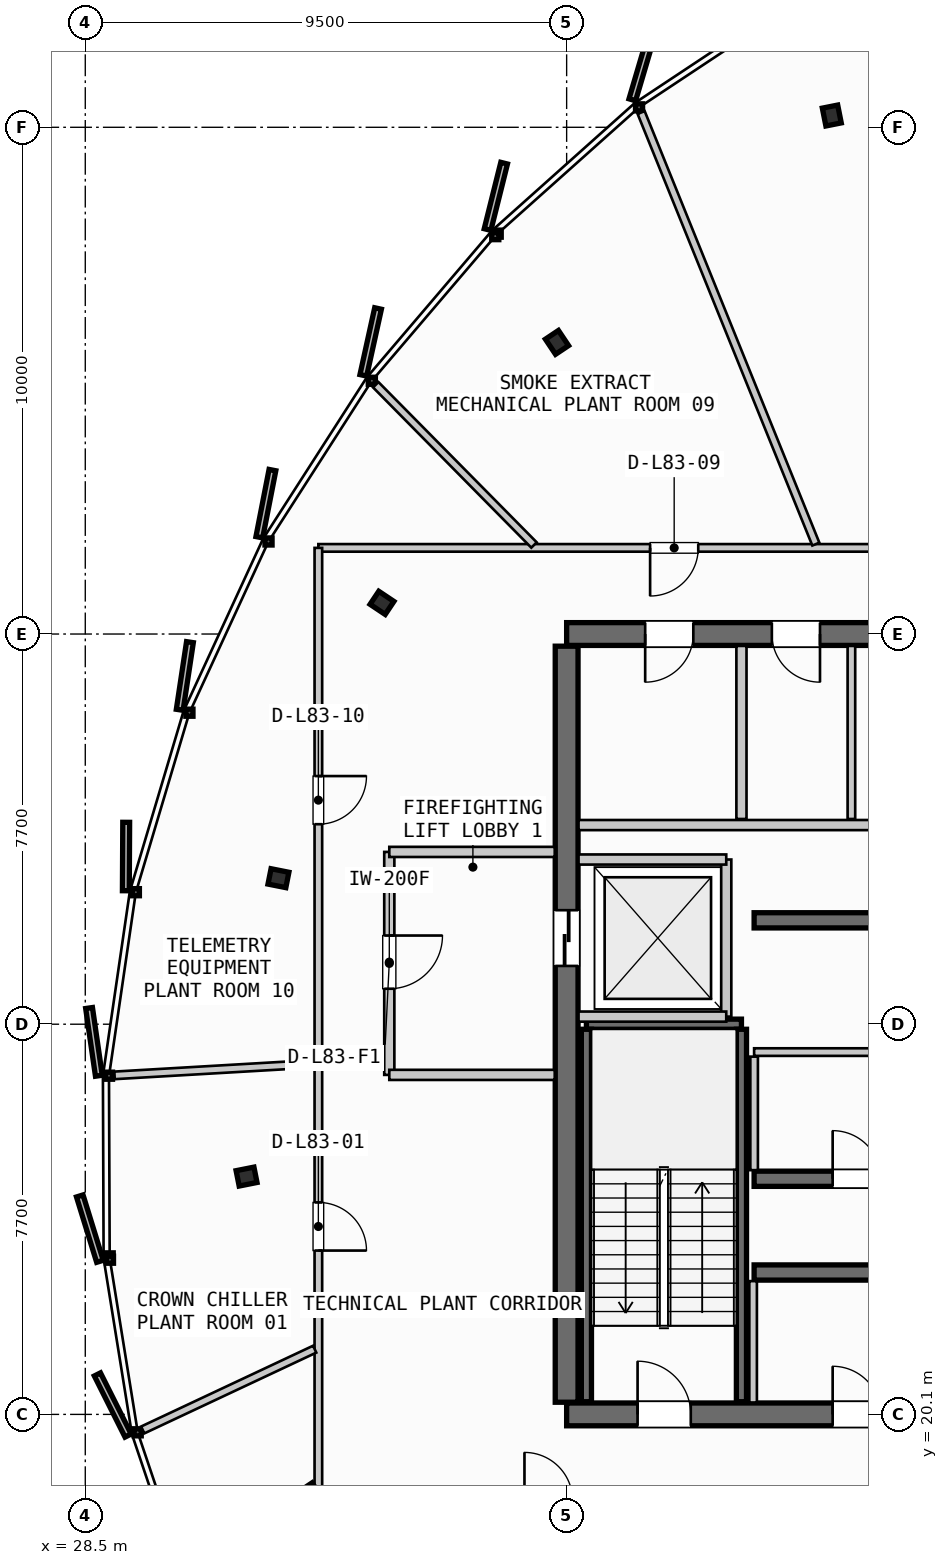
"""IFC4 building model, lengths in metres.
Left out: names, types, materials, properties, quantities, classifications, styles, units other than length and angle.
Written with IfcOpenShell. Run it as: python <this file> out.ifc"""

import sys

from ifc_helpers import new_model, si_unit, direction, frame, frame_2d, origin, origin_2d, place, context, subcontext, project, spatial, rectangle, i_section, extrude, source, transform, mapped, element, fill, save


model = new_model("IFC4")
c1 = context("Model", 3, precision=1e-05, world=origin(), true_north=direction((0.0, 1.0)))
c2 = subcontext(c1, "Body", "Model", "MODEL_VIEW")
j1 = project(units=[si_unit("LENGTHUNIT", "METRE"), si_unit("PLANEANGLEUNIT", "RADIAN")], contexts=[c1])
p1 = place(None, origin())
s1 = spatial("IfcSite", under=j1, at=p1, CompositionType="ELEMENT")
p2 = place(p1, origin())
s2 = spatial("IfcBuilding", under=s1, at=p2, CompositionType="ELEMENT")
p3 = place(p2, frame((0.0, 0.0, 312.3)))
s3 = spatial("IfcBuildingStorey", under=s2, at=p3, CompositionType="ELEMENT", Elevation=312.3)
p4 = place(p3, frame((38.0, 20.1, 0.0), z_axis=(0.0, 0.0, 1.0), x_axis=(1.0, 0.0, 0.0)))
e1 = element("IfcWall", 1, at=p4, inside=s3, PredefinedType="SHEAR", context=c2, shape_type="SweptSolid", body=[
    extrude(rectangle(XDim=17.6, YDim=0.45, at=frame_2d((8.8, 0.0))), origin(), (0.0, 0.0, 1.0), 3.735),
])
p5 = place(p4, frame((1.4, 0.0, 0.0)))
e2 = element("IfcOpeningElement", 2, at=p5, cuts=e1, PredefinedType="OPENING", context=c2, shape_type="SweptSolid", body=[
    extrude(rectangle(XDim=1.05, YDim=2.15, at=frame_2d((0.525, 1.075))), frame((0.0, 0.235, 0.0), z_axis=(0.0, -1.0, 0.0), x_axis=(1.0, 0.0, 0.0)), (0.0, 0.0, 1.0), 0.47),
])
p6 = place(p4, frame((15.15, 0.0, 0.0)))
e3 = element("IfcOpeningElement", 3, at=p6, cuts=e1, PredefinedType="OPENING", context=c2, shape_type="SweptSolid", body=[
    extrude(rectangle(XDim=1.05, YDim=2.15, at=frame_2d((0.525, 1.075))), frame((0.0, 0.235, 0.0), z_axis=(0.0, -1.0, 0.0), x_axis=(1.0, 0.0, 0.0)), (0.0, 0.0, 1.0), 0.47),
])
p7 = place(p4, frame((5.25, 0.0, 0.0)))
e4 = element("IfcOpeningElement", 4, at=p7, cuts=e1, PredefinedType="OPENING", context=c2, shape_type="SweptSolid", body=[
    extrude(rectangle(XDim=0.95, YDim=2.15, at=frame_2d((0.475, 1.075))), frame((0.0, 0.235, 0.0), z_axis=(0.0, -1.0, 0.0), x_axis=(1.0, 0.0, 0.0)), (0.0, 0.0, 1.0), 0.47),
])
p8 = place(p4, frame((11.4, 0.0, 0.0)))
e5 = element("IfcOpeningElement", 5, at=p8, cuts=e1, PredefinedType="OPENING", context=c2, shape_type="SweptSolid", body=[
    extrude(rectangle(XDim=0.95, YDim=2.15, at=frame_2d((0.475, 1.075))), frame((0.0, 0.235, 0.0), z_axis=(0.0, -1.0, 0.0), x_axis=(1.0, 0.0, 0.0)), (0.0, 0.0, 1.0), 0.47),
])
p9 = place(p3, frame((55.6, 35.5, 0.0), z_axis=(0.0, 0.0, 1.0), x_axis=(-1.0, 0.0, 0.0)))
e6 = element("IfcWall", 6, at=p9, inside=s3, PredefinedType="SHEAR", context=c2, shape_type="SweptSolid", body=[
    extrude(rectangle(XDim=17.6, YDim=0.45, at=frame_2d((8.8, 0.0))), origin(), (0.0, 0.0, 1.0), 3.735),
])
p10 = place(p9, frame((8.05, 0.0, 0.0)))
e7 = element("IfcOpeningElement", 7, at=p10, cuts=e6, PredefinedType="OPENING", context=c2, shape_type="SweptSolid", body=[
    extrude(rectangle(XDim=1.5, YDim=2.2, at=frame_2d((0.75, 1.1))), frame((0.0, 0.235, 0.0), z_axis=(0.0, -1.0, 0.0), x_axis=(1.0, 0.0, 0.0)), (0.0, 0.0, 1.0), 0.47),
])
p11 = place(p9, frame((15.1, 0.0, 0.0)))
e8 = element("IfcOpeningElement", 8, at=p11, cuts=e6, PredefinedType="OPENING", context=c2, shape_type="SweptSolid", body=[
    extrude(rectangle(XDim=0.95, YDim=2.15, at=frame_2d((0.475, 1.075))), frame((0.0, 0.235, 0.0), z_axis=(0.0, -1.0, 0.0), x_axis=(1.0, 0.0, 0.0)), (0.0, 0.0, 1.0), 0.47),
])
p12 = place(p9, frame((12.6, 0.0, 0.0)))
e9 = element("IfcOpeningElement", 9, at=p12, cuts=e6, PredefinedType="OPENING", context=c2, shape_type="SweptSolid", body=[
    extrude(rectangle(XDim=0.95, YDim=2.15, at=frame_2d((0.475, 1.075))), frame((0.0, 0.235, 0.0), z_axis=(0.0, -1.0, 0.0), x_axis=(1.0, 0.0, 0.0)), (0.0, 0.0, 1.0), 0.47),
])
p13 = place(p9, frame((10.45, 0.0, 0.0)))
e10 = element("IfcOpeningElement", 10, at=p13, cuts=e6, PredefinedType="OPENING", context=c2, shape_type="SweptSolid", body=[
    extrude(rectangle(XDim=0.95, YDim=2.15, at=frame_2d((0.475, 1.075))), frame((0.0, 0.235, 0.0), z_axis=(0.0, -1.0, 0.0), x_axis=(1.0, 0.0, 0.0)), (0.0, 0.0, 1.0), 0.47),
])
p14 = place(p3, frame((38.0, 35.26, 0.0), z_axis=(0.0, 0.0, 1.0), x_axis=(0.0, -1.0, 0.0)))
e11 = element("IfcWall", 11, at=p14, inside=s3, PredefinedType="SHEAR", context=c2, shape_type="SweptSolid", body=[
    extrude(rectangle(XDim=14.92, YDim=0.45, at=frame_2d((7.46, 0.0))), origin(), (0.0, 0.0, 1.0), 3.735),
])
p15 = place(p14, frame((5.21, 0.0, 0.0)))
e12 = element("IfcOpeningElement", 12, at=p15, cuts=e11, PredefinedType="OPENING", context=c2, shape_type="SweptSolid", body=[
    extrude(rectangle(XDim=1.1, YDim=2.2, at=frame_2d((0.55, 1.1))), frame((0.0, 0.235, 0.0), z_axis=(0.0, -1.0, 0.0), x_axis=(1.0, 0.0, 0.0)), (0.0, 0.0, 1.0), 0.47),
])
p16 = place(p3, frame((41.7, 22.9, 0.0), z_axis=(0.0, 0.0, 1.0), x_axis=(1.0, 0.0, 0.0)))
e13 = element("IfcWall", 13, at=p16, inside=s3, PredefinedType="SHEAR", context=c2, shape_type="SweptSolid", body=[
    extrude(rectangle(XDim=4.25, YDim=0.3, at=frame_2d((2.125, 0.0))), origin(), (0.0, 0.0, 1.0), 3.735),
])
p17 = place(p3, frame((41.7, 24.75, 0.0), z_axis=(0.0, 0.0, 1.0), x_axis=(1.0, 0.0, 0.0)))
e14 = element("IfcWall", 14, at=p17, inside=s3, PredefinedType="SHEAR", context=c2, shape_type="SweptSolid", body=[
    extrude(rectangle(XDim=4.25, YDim=0.3, at=frame_2d((2.125, 0.0))), origin(), (0.0, 0.0, 1.0), 3.735),
])
p18 = place(p17, frame((1.55, 0.0, 0.0)))
e15 = element("IfcOpeningElement", 15, at=p18, cuts=e14, PredefinedType="OPENING", context=c2, shape_type="SweptSolid", body=[
    extrude(rectangle(XDim=0.95, YDim=2.15, at=frame_2d((0.475, 1.075))), frame((0.0, 0.16, 0.0), z_axis=(0.0, -1.0, 0.0), x_axis=(1.0, 0.0, 0.0)), (0.0, 0.0, 1.0), 0.32),
])
p19 = place(p3, frame((41.7, 29.85, 0.0), z_axis=(0.0, 0.0, 1.0), x_axis=(1.0, 0.0, 0.0)))
e16 = element("IfcWall", 16, at=p19, inside=s3, PredefinedType="SHEAR", context=c2, shape_type="SweptSolid", body=[
    extrude(rectangle(XDim=4.25, YDim=0.3, at=frame_2d((2.125, 0.0))), origin(), (0.0, 0.0, 1.0), 3.735),
])
m1 = source(origin(), c2, "Body", "SweptSolid", [
    extrude(i_section(OverallWidth=0.309, OverallDepth=0.359, WebThickness=0.016, FlangeThickness=0.026, FilletRadius=0.027, at=origin_2d()), origin(), (0.0, 0.0, 1.0), 3.735),
])
for number, where, z_axis, x_axis in (
    (17, (43.233, 45.732, 0.0), (0.0, 0.0, 1.0), (-0.195, 0.981, 0.0)),
    (18, (37.81, 41.255, 0.0), (0.0, 0.0, 1.0), (-0.556, 0.831, 0.0)),
    (19, (34.356, 36.115, 0.0), (0.0, 0.0, 1.0), (-0.831, 0.556, 0.0)),
    (20, (32.312, 30.682, 0.0), (0.0, 0.0, 1.0), (-0.981, 0.195, 0.0)),
    (21, (31.683, 24.793, 0.0), (0.0, 0.0, 1.0), (-0.981, -0.195, 0.0)),
    (22, (32.913, 18.521, 0.0), (0.0, 0.0, 1.0), (-0.831, -0.556, 0.0)),
):
    element("IfcColumn", number, at=place(p3, frame(where, z_axis=z_axis, x_axis=x_axis)), inside=s3, PredefinedType="COLUMN", context=c2, shape_type="MappedRepresentation", body=[
        mapped(m1, transform((0.0, 0.0, 0.0), scale=1.0)),
    ])
p20 = place(p3, frame((38.39, 27.8, 0.0), z_axis=(0.0, 0.0, 1.0), x_axis=(1.0, 0.0, 0.0)))
e23 = element("IfcWall", 23, at=p20, inside=s3, PredefinedType="SHEAR", context=c2, shape_type="SweptSolid", body=[
    extrude(rectangle(XDim=3.06, YDim=0.2, at=frame_2d((1.53, 0.0))), origin(), (0.0, 0.0, 1.0), 3.735),
])
for number, where, z_axis, x_axis in (
    (24, (41.45, 27.7, 0.0), (0.0, 0.0, 1.0), (0.0, -1.0, 0.0)),
    (25, (38.39, 20.35, 0.0), (0.0, 0.0, 1.0), (0.0, 1.0, 0.0)),
):
    element("IfcWall", number, at=place(p3, frame(where, z_axis=z_axis, x_axis=x_axis)), inside=s3, PredefinedType="SHEAR", context=c2, shape_type="SweptSolid", body=[
        extrude(rectangle(XDim=7.35, YDim=0.2, at=frame_2d((3.675, 0.0))), origin(), (0.0, 0.0, 1.0), 3.735),
    ])
p21 = place(p3, frame((41.15, 27.95, 0.0), z_axis=(0.0, 0.0, 1.0), x_axis=(0.0, 1.0, 0.0)))
e26 = element("IfcWall", 26, at=p21, inside=s3, PredefinedType="PARTITIONING", context=c2, shape_type="SweptSolid", body=[
    extrude(rectangle(XDim=3.1, YDim=0.2, at=frame_2d((1.55, 0.0))), origin(), (0.0, 0.0, 1.0), 3.26),
])
for number, where, z_axis, x_axis in (
    (27, (38.235, 27.95, 0.0), (0.0, 0.0, 1.0), (1.0, 0.0, 0.0)),
    (28, (38.235, 31.05, 0.0), (0.0, 0.0, 1.0), (1.0, 0.0, 0.0)),
):
    element("IfcWall", number, at=place(p3, frame(where, z_axis=z_axis, x_axis=x_axis)), inside=s3, PredefinedType="PARTITIONING", context=c2, shape_type="SweptSolid", body=[
        extrude(rectangle(XDim=2.915, YDim=0.2, at=frame_2d((1.458, 0.0))), origin(), (0.0, 0.0, 1.0), 3.26),
    ])
p22 = place(p3, frame((34.5, 31.2, 0.0), z_axis=(0.0, 0.0, 1.0), x_axis=(0.0, -1.0, 0.0)))
e29 = element("IfcWall", 29, at=p22, inside=s3, PredefinedType="PARTITIONING", context=c2, shape_type="SweptSolid", body=[
    extrude(rectangle(XDim=4.4, YDim=0.2, at=frame_2d((2.2, 0.0))), origin(), (0.0, 0.0, 1.0), 3.26),
])
p23 = place(p22, frame((1.65, 0.0, 0.0)))
e30 = element("IfcOpeningElement", 30, at=p23, cuts=e29, PredefinedType="OPENING", context=c2, shape_type="SweptSolid", body=[
    extrude(rectangle(XDim=1.05, YDim=2.15, at=frame_2d((0.525, 1.075))), frame((0.0, 0.11, 0.0), z_axis=(0.0, -1.0, 0.0), x_axis=(1.0, 0.0, 0.0)), (0.0, 0.0, 1.0), 0.22),
])
for number, where, z_axis, x_axis in (
    (31, (34.5, 26.8, 0.0), (0.0, 0.0, 1.0), (1.0, 0.0, 0.0)),
    (32, (34.5, 31.2, 0.0), (0.0, 0.0, 1.0), (1.0, 0.0, 0.0)),
):
    element("IfcWall", number, at=place(p3, frame(where, z_axis=z_axis, x_axis=x_axis)), inside=s3, PredefinedType="PARTITIONING", context=c2, shape_type="SweptSolid", body=[
        extrude(rectangle(XDim=3.265, YDim=0.2, at=frame_2d((1.632, 0.0))), origin(), (0.0, 0.0, 1.0), 3.26),
    ])
p24 = place(p3, frame((41.68, 20.335, 0.0), z_axis=(0.0, 0.0, 1.0), x_axis=(0.0, 1.0, 0.0)))
e33 = element("IfcWall", 33, at=p24, inside=s3, PredefinedType="PARTITIONING", context=c2, shape_type="SweptSolid", body=[
    extrude(rectangle(XDim=2.395, YDim=0.15, at=frame_2d((1.198, 0.0))), origin(), (0.0, 0.0, 1.0), 3.26),
])
p25 = place(p3, frame((41.7, 27.25, 0.0), z_axis=(0.0, 0.0, 1.0), x_axis=(1.0, 0.0, 0.0)))
e34 = element("IfcWall", 34, at=p25, inside=s3, PredefinedType="PARTITIONING", context=c2, shape_type="SweptSolid", body=[
    extrude(rectangle(XDim=4.25, YDim=0.15, at=frame_2d((2.125, 0.0))), origin(), (0.0, 0.0, 1.0), 3.26),
])
p26 = place(p3, frame((41.7, 24.92, 0.0), z_axis=(0.0, 0.0, 1.0), x_axis=(0.0, 1.0, 0.0)))
e35 = element("IfcWall", 35, at=p26, inside=s3, PredefinedType="PARTITIONING", context=c2, shape_type="SweptSolid", body=[
    extrude(rectangle(XDim=2.24, YDim=0.15, at=frame_2d((1.12, 0.0))), origin(), (0.0, 0.0, 1.0), 3.26),
])
p27 = place(p3, frame((41.45, 31.85, 0.0), z_axis=(0.0, 0.0, 1.0), x_axis=(0.0, 1.0, 0.0)))
e36 = element("IfcWall", 36, at=p27, inside=s3, PredefinedType="PARTITIONING", context=c2, shape_type="SweptSolid", body=[
    extrude(rectangle(XDim=3.415, YDim=0.2, at=frame_2d((1.708, 0.0))), origin(), (0.0, 0.0, 1.0), 3.26),
])
p28 = place(p3, frame((38.235, 31.73, 0.0), z_axis=(0.0, 0.0, 1.0), x_axis=(1.0, 0.0, 0.0)))
e37 = element("IfcWall", 37, at=p28, inside=s3, PredefinedType="PARTITIONING", context=c2, shape_type="SweptSolid", body=[
    extrude(rectangle(XDim=7.565, YDim=0.2, at=frame_2d((3.782, 0.0))), origin(), (0.0, 0.0, 1.0), 3.26),
])
p29 = place(p3, frame((43.62, 31.85, 0.0), z_axis=(0.0, 0.0, 1.0), x_axis=(0.0, 1.0, 0.0)))
e38 = element("IfcWall", 38, at=p29, inside=s3, PredefinedType="PLUMBINGWALL", context=c2, shape_type="SweptSolid", body=[
    extrude(rectangle(XDim=3.415, YDim=0.15, at=frame_2d((1.708, 0.0))), origin(), (0.0, 0.0, 1.0), 3.26),
])
p30 = place(p3, frame((60.5, 37.2, 0.0), z_axis=(0.0, 0.0, 1.0), x_axis=(-1.0, 0.0, 0.0)))
e39 = element("IfcWall", 39, at=p30, inside=s3, PredefinedType="PARTITIONING", context=c2, shape_type="SweptSolid", body=[
    extrude(rectangle(XDim=27.4, YDim=0.15, at=frame_2d((13.7, 0.0))), origin(), (0.0, 0.0, 1.0), 3.26),
])
p31 = place(p30, frame((4.14, 0.0, 0.0)))
e40 = element("IfcOpeningElement", 40, at=p31, cuts=e39, PredefinedType="OPENING", context=c2, shape_type="SweptSolid", body=[
    extrude(rectangle(XDim=0.95, YDim=2.15, at=frame_2d((0.475, 1.075))), frame((0.0, 0.085, 0.0), z_axis=(0.0, -1.0, 0.0), x_axis=(1.0, 0.0, 0.0)), (0.0, 0.0, 1.0), 0.17),
])
p32 = place(p30, frame((12.619, 0.0, 0.0)))
e41 = element("IfcOpeningElement", 41, at=p32, cuts=e39, PredefinedType="OPENING", context=c2, shape_type="SweptSolid", body=[
    extrude(rectangle(XDim=0.95, YDim=2.15, at=frame_2d((0.475, 1.075))), frame((0.0, 0.085, 0.0), z_axis=(0.0, -1.0, 0.0), x_axis=(1.0, 0.0, 0.0)), (0.0, 0.0, 1.0), 0.17),
])
p33 = place(p30, frame((19.903, 0.0, 0.0)))
e42 = element("IfcOpeningElement", 42, at=p33, cuts=e39, PredefinedType="OPENING", context=c2, shape_type="SweptSolid", body=[
    extrude(rectangle(XDim=0.95, YDim=2.15, at=frame_2d((0.475, 1.075))), frame((0.0, 0.085, 0.0), z_axis=(0.0, -1.0, 0.0), x_axis=(1.0, 0.0, 0.0)), (0.0, 0.0, 1.0), 0.17),
])
p34 = place(p3, frame((33.1, 37.2, 0.0), z_axis=(0.0, 0.0, 1.0), x_axis=(0.0, -1.0, 0.0)))
e43 = element("IfcWall", 43, at=p34, inside=s3, PredefinedType="PARTITIONING", context=c2, shape_type="SweptSolid", body=[
    extrude(rectangle(XDim=18.8, YDim=0.15, at=frame_2d((9.4, 0.0))), origin(), (0.0, 0.0, 1.0), 3.26),
])
p35 = place(p34, frame((12.917, 0.0, 0.0)))
e44 = element("IfcOpeningElement", 44, at=p35, cuts=e43, PredefinedType="OPENING", context=c2, shape_type="SweptSolid", body=[
    extrude(rectangle(XDim=0.95, YDim=2.15, at=frame_2d((0.475, 1.075))), frame((0.0, 0.085, 0.0), z_axis=(0.0, -1.0, 0.0), x_axis=(1.0, 0.0, 0.0)), (0.0, 0.0, 1.0), 0.17),
])
p36 = place(p34, frame((4.503, 0.0, 0.0)))
e45 = element("IfcOpeningElement", 45, at=p36, cuts=e43, PredefinedType="OPENING", context=c2, shape_type="SweptSolid", body=[
    extrude(rectangle(XDim=0.95, YDim=2.15, at=frame_2d((0.475, 1.075))), frame((0.0, 0.085, 0.0), z_axis=(0.0, -1.0, 0.0), x_axis=(1.0, 0.0, 0.0)), (0.0, 0.0, 1.0), 0.17),
])
p37 = place(p3, frame((33.02, 27.02, 0.0), z_axis=(0.0, 0.0, 1.0), x_axis=(-0.998313378313, -0.058055134838, 0.0)))
e46 = element("IfcWall", 46, at=p37, inside=s3, PredefinedType="PARTITIONING", context=c2, shape_type="SweptSolid", body=[
    extrude(rectangle(XDim=3.949, YDim=0.15, at=frame_2d((1.974, 0.0))), origin(), (0.0, 0.0, 1.0), 3.26),
])
p38 = place(p3, frame((33.028, 21.387, 0.0), z_axis=(0.0, 0.0, 1.0), x_axis=(-0.905123946603, -0.425147787581, 0.0)))
e47 = element("IfcWall", 47, at=p38, inside=s3, PredefinedType="PARTITIONING", context=c2, shape_type="SweptSolid", body=[
    extrude(rectangle(XDim=3.749, YDim=0.15, at=frame_2d((1.875, 0.0))), origin(), (0.0, 0.0, 1.0), 3.26),
])
p39 = place(p3, frame((42.918, 37.274, 0.0), z_axis=(0.0, 0.0, 1.0), x_axis=(-0.375226458989, 0.926933171526, 0.0)))
e48 = element("IfcWall", 48, at=p39, inside=s3, PredefinedType="PARTITIONING", context=c2, shape_type="SweptSolid", body=[
    extrude(rectangle(XDim=9.188, YDim=0.15, at=frame_2d((4.594, 0.0))), origin(), (0.0, 0.0, 1.0), 3.26),
])
p40 = place(p3, frame((37.356, 37.257, 0.0), z_axis=(0.0, 0.0, 1.0), x_axis=(-0.702698856126, 0.711487398061, 0.0)))
e49 = element("IfcWall", 49, at=p40, inside=s3, PredefinedType="PARTITIONING", context=c2, shape_type="SweptSolid", body=[
    extrude(rectangle(XDim=4.445, YDim=0.15, at=frame_2d((2.222, 0.0))), origin(), (0.0, 0.0, 1.0), 3.26),
])
m2 = source(origin(), c2, "Body", "SweptSolid", [
    extrude(rectangle(XDim=1.05, YDim=2.15, at=frame_2d((0.525, 1.075))), frame((0.0, 0.025, 0.0), z_axis=(0.0, -1.0, 0.0), x_axis=(1.0, 0.0, 0.0)), (0.0, 0.0, 1.0), 0.05),
])
p41 = place(p5, origin())
e50 = element("IfcDoor", 50, at=p41, inside=s3, OperationType="SINGLE_SWING_LEFT", PredefinedType="DOOR", context=c2, shape_type="MappedRepresentation", body=[
    mapped(m2, transform((0.0, 0.0, 0.0), scale=1.0)),
])
fill(e2, e50)
m3 = source(origin(), c2, "Body", "SweptSolid", [
    extrude(rectangle(XDim=1.1, YDim=2.2, at=frame_2d((0.55, 1.1))), frame((0.0, 0.025, 0.0), z_axis=(0.0, -1.0, 0.0), x_axis=(1.0, 0.0, 0.0)), (0.0, 0.0, 1.0), 0.05),
])
p42 = place(p15, origin())
e51 = element("IfcDoor", 51, at=p42, inside=s3, OperationType="SLIDING_TO_LEFT", PredefinedType="DOOR", context=c2, shape_type="MappedRepresentation", body=[
    mapped(m3, transform((0.0, 0.0, 0.0), scale=1.0)),
])
fill(e12, e51)
m4 = source(origin(), c2, "Body", "SweptSolid", [
    extrude(rectangle(XDim=0.95, YDim=2.15, at=frame_2d((0.475, 1.075))), frame((0.0, 0.025, 0.0), z_axis=(0.0, -1.0, 0.0), x_axis=(1.0, 0.0, 0.0)), (0.0, 0.0, 1.0), 0.05),
])
p43 = place(p7, origin())
e52 = element("IfcDoor", 52, at=p43, inside=s3, OperationType="SINGLE_SWING_LEFT", PredefinedType="DOOR", context=c2, shape_type="MappedRepresentation", body=[
    mapped(m4, transform((0.0, 0.0, 0.0), scale=1.0)),
])
fill(e4, e52)
p44 = place(p18, origin())
e53 = element("IfcDoor", 53, at=p44, inside=s3, OperationType="SINGLE_SWING_LEFT", PredefinedType="DOOR", context=c2, shape_type="MappedRepresentation", body=[
    mapped(m4, transform((0.0, 0.0, 0.0), scale=1.0)),
])
fill(e15, e53)
p45 = place(p11, origin())
e54 = element("IfcDoor", 54, at=p45, inside=s3, OperationType="SINGLE_SWING_RIGHT", PredefinedType="DOOR", context=c2, shape_type="MappedRepresentation", body=[
    mapped(m4, transform((0.0, 0.0, 0.0), scale=1.0)),
])
fill(e8, e54)
p46 = place(p12, origin())
e55 = element("IfcDoor", 55, at=p46, inside=s3, OperationType="SINGLE_SWING_LEFT", PredefinedType="DOOR", context=c2, shape_type="MappedRepresentation", body=[
    mapped(m4, transform((0.0, 0.0, 0.0), scale=1.0)),
])
fill(e9, e55)
p47 = place(p23, origin())
e56 = element("IfcDoor", 56, at=p47, inside=s3, OperationType="SINGLE_SWING_LEFT", PredefinedType="DOOR", context=c2, shape_type="MappedRepresentation", body=[
    mapped(m2, transform((0.0, 0.0, 0.0), scale=1.0)),
])
fill(e30, e56)
p48 = place(p33, origin())
e57 = element("IfcDoor", 57, at=p48, inside=s3, OperationType="SINGLE_SWING_RIGHT", PredefinedType="DOOR", context=c2, shape_type="MappedRepresentation", body=[
    mapped(m4, transform((0.0, 0.0, 0.0), scale=1.0)),
])
fill(e42, e57)
p49 = place(p35, origin())
e58 = element("IfcDoor", 58, at=p49, inside=s3, OperationType="SINGLE_SWING_RIGHT", PredefinedType="DOOR", context=c2, shape_type="MappedRepresentation", body=[
    mapped(m4, transform((0.0, 0.0, 0.0), scale=1.0)),
])
fill(e44, e58)
p50 = place(p36, origin())
e59 = element("IfcDoor", 59, at=p50, inside=s3, OperationType="SINGLE_SWING_LEFT", PredefinedType="DOOR", context=c2, shape_type="MappedRepresentation", body=[
    mapped(m4, transform((0.0, 0.0, 0.0), scale=1.0)),
])
fill(e45, e59)
save(model, sys.argv[1])
